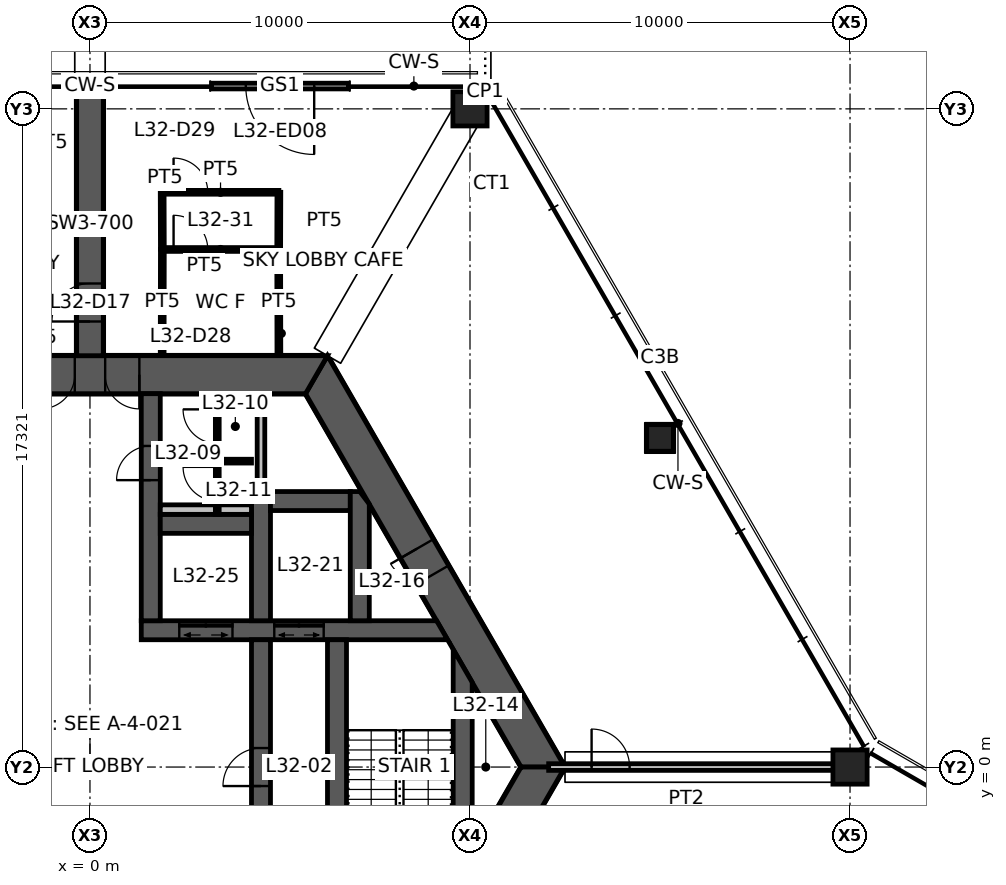
"""IFC4 building model, lengths in metres.
Left out: names, types, materials, properties, quantities, classifications, styles, units other than length and angle.
Written with IfcOpenShell. Run it as: python <this file> out.ifc"""

import sys

from ifc_helpers import new_model, si_unit, direction, frame, frame_2d, origin, origin_2d, place, context, subcontext, project, spatial, polyline, rectangle, hollow_rectangle, outline, extrude, element, fill, save


model = new_model("IFC4")
c1 = context("Model", 3, precision=1e-05, world=origin(), true_north=direction((0.0, 1.0)))
c2 = subcontext(c1, "Body", "Model", "MODEL_VIEW")
j1 = project(units=[si_unit("LENGTHUNIT", "METRE"), si_unit("PLANEANGLEUNIT", "RADIAN")], contexts=[c1])
p1 = place(None, origin())
s1 = spatial("IfcSite", under=j1, at=p1, CompositionType="ELEMENT")
p2 = place(p1, origin())
s2 = spatial("IfcBuilding", under=s1, at=p2, CompositionType="ELEMENT")
p3 = place(p2, frame((0.0, 0.0, 128.6)))
s3 = spatial("IfcBuildingStorey", under=s2, at=p3, CompositionType="ELEMENT", Elevation=128.6)
for number, where, z_axis, x_axis in (
    (1, (20.0, 0.0, 0.0), (0.0, 0.0, 1.0), (1.0, 0.0, 0.0)),
    (2, (10.0, 17.321, 0.0), (0.0, 0.0, 1.0), (1.0, 0.0, 0.0)),
):
    element("IfcColumn", number, at=place(p3, frame(where, z_axis=z_axis, x_axis=x_axis)), inside=s3, PredefinedType="COLUMN", context=c2, shape_type="SweptSolid", body=[
        extrude(hollow_rectangle(XDim=0.9, YDim=0.9, WallThickness=0.07, at=origin_2d()), origin(), (0.0, 0.0, 1.0), 4.5),
    ])
p4 = place(p3, frame((15.0, 8.66, 0.0), z_axis=(0.0, 0.0, 1.0), x_axis=(1.0, 0.0, 0.0)))
e3 = element("IfcColumn", 3, at=p4, inside=s3, PredefinedType="COLUMN", context=c2, shape_type="SweptSolid", body=[
    extrude(hollow_rectangle(XDim=0.7, YDim=0.7, WallThickness=0.036, at=origin_2d()), origin(), (0.0, 0.0, 1.0), 4.5),
])
p5 = place(p3, frame((11.922, 0.0, 0.0), z_axis=(0.0, 0.0, 1.0), x_axis=(-0.500004296715, 0.866022923061, 0.0)))
e4 = element("IfcWall", 4, at=p5, inside=s3, PredefinedType="SHEAR", context=c2, shape_type="SweptSolid", body=[
    extrude(outline(polyline([(-0.289, -0.5), (5.835, -0.5), (6.635, -0.5), (12.211, -0.5), (11.634, 0.5), (6.635, 0.5), (5.835, 0.5), (0.289, 0.5), (-0.289, -0.5)])), origin(), (0.0, 0.0, 1.0), 4.5),
])
p6 = place(p5, frame((5.835, 0.0, 0.0)))
e5 = element("IfcOpeningElement", 5, at=p6, cuts=e4, PredefinedType="OPENING", context=c2, shape_type="SweptSolid", body=[
    extrude(rectangle(XDim=0.8, YDim=2.1, at=frame_2d((0.4, 1.05))), frame((0.0, 0.51, 0.0), z_axis=(0.0, -1.0, 0.0), x_axis=(1.0, 0.0, 0.0)), (0.0, 0.0, 1.0), 1.02),
])
p7 = place(p3, frame((5.961, 10.325, 0.0), z_axis=(0.0, 0.0, 1.0), x_axis=(-1.0, 0.0, 0.0)))
e6 = element("IfcWall", 6, at=p7, inside=s3, PredefinedType="SHEAR", context=c2, shape_type="SweptSolid", body=[
    extrude(outline(polyline([(-0.289, -0.5), (4.661, -0.5), (5.561, -0.5), (6.361, -0.5), (7.261, -0.5), (12.211, -0.5), (11.634, 0.5), (7.261, 0.5), (6.361, 0.5), (5.561, 0.5), (4.661, 0.5), (0.289, 0.5), (-0.289, -0.5)])), origin(), (0.0, 0.0, 1.0), 4.5),
])
p8 = place(p7, frame((6.361, 0.0, 0.0)))
e7 = element("IfcOpeningElement", 7, at=p8, cuts=e6, PredefinedType="OPENING", context=c2, shape_type="SweptSolid", body=[
    extrude(rectangle(XDim=0.9, YDim=2.1, at=frame_2d((0.45, 1.05))), frame((0.0, 0.51, 0.0), z_axis=(0.0, -1.0, 0.0), x_axis=(1.0, 0.0, 0.0)), (0.0, 0.0, 1.0), 1.02),
])
p9 = place(p7, frame((4.661, 0.0, 0.0)))
e8 = element("IfcOpeningElement", 8, at=p9, cuts=e6, PredefinedType="OPENING", context=c2, shape_type="SweptSolid", body=[
    extrude(rectangle(XDim=0.9, YDim=2.1, at=frame_2d((0.45, 1.05))), frame((0.0, 0.51, 0.0), z_axis=(0.0, -1.0, 0.0), x_axis=(1.0, 0.0, 0.0)), (0.0, 0.0, 1.0), 1.02),
])
p10 = place(p3, frame((5.961, -10.325, 0.0), z_axis=(0.0, 0.0, 1.0), x_axis=(0.500004296715, 0.866022923061, 0.0)))
e9 = element("IfcWall", 9, at=p10, inside=s3, PredefinedType="SHEAR", context=c2, shape_type="SweptSolid", body=[
    extrude(outline(polyline([(-0.289, -0.5), (4.594, -0.5), (5.394, -0.5), (12.211, -0.5), (11.634, 0.5), (5.394, 0.5), (4.594, 0.5), (0.289, 0.5), (-0.289, -0.5)])), origin(), (0.0, 0.0, 1.0), 4.5),
])
p11 = place(p10, frame((4.594, 0.0, 0.0)))
e10 = element("IfcOpeningElement", 10, at=p11, cuts=e9, PredefinedType="OPENING", context=c2, shape_type="SweptSolid", body=[
    extrude(rectangle(XDim=0.8, YDim=2.1, at=frame_2d((0.4, 1.05))), frame((0.0, 0.51, 0.0), z_axis=(0.0, -1.0, 0.0), x_axis=(1.0, 0.0, 0.0)), (0.0, 0.0, 1.0), 1.02),
])
p12 = place(p3, frame((0.0, 10.825, 0.0), z_axis=(0.0, 0.0, 1.0), x_axis=(0.0, 1.0, 0.0)))
e11 = element("IfcWall", 11, at=p12, inside=s3, PredefinedType="SHEAR", context=c2, shape_type="SweptSolid", body=[
    extrude(rectangle(XDim=6.946, YDim=0.7, at=frame_2d((3.473, 0.0))), origin(), (0.0, 0.0, 1.0), 4.5),
])
p13 = place(p12, frame((0.9, 0.0, 0.0)))
e12 = element("IfcOpeningElement", 12, at=p13, cuts=e11, PredefinedType="OPENING", context=c2, shape_type="SweptSolid", body=[
    extrude(rectangle(XDim=1.0, YDim=2.1, at=frame_2d((0.5, 1.05))), frame((0.0, 0.36, 0.0), z_axis=(0.0, -1.0, 0.0), x_axis=(1.0, 0.0, 0.0)), (0.0, 0.0, 1.0), 0.72),
])
p14 = place(p3, frame((6.8, 17.92, 0.0), z_axis=(0.0, 0.0, 1.0), x_axis=(-1.0, 0.0, 0.0)))
e13 = element("IfcWall", 13, at=p14, inside=s3, PredefinedType="STANDARD", context=c2, shape_type="SweptSolid", body=[
    extrude(rectangle(XDim=3.6, YDim=0.15, at=frame_2d((1.8, 0.0))), origin(), (0.0, 0.0, 1.0), 4.5),
])
p15 = place(p14, frame((0.9, 0.0, 0.0)))
e14 = element("IfcOpeningElement", 14, at=p15, cuts=e13, PredefinedType="OPENING", context=c2, shape_type="SweptSolid", body=[
    extrude(rectangle(XDim=1.8, YDim=2.1, at=frame_2d((0.9, 1.05))), frame((0.0, 0.085, 0.0), z_axis=(0.0, -1.0, 0.0), x_axis=(1.0, 0.0, 0.0)), (0.0, 0.0, 1.0), 0.17),
])
p16 = place(p3, frame((1.35, 3.6, 0.0), z_axis=(0.0, 0.0, 1.0), x_axis=(1.0, 0.0, 0.0)))
e15 = element("IfcWall", 15, at=p16, inside=s3, PredefinedType="SHEAR", context=c2, shape_type="SweptSolid", body=[
    extrude(outline(polyline([(0.0, -0.25), (1.0, -0.25), (2.4, -0.25), (3.5, -0.25), (4.8, -0.25), (8.061, -0.25), (7.772, 0.25), (4.8, 0.25), (3.5, 0.25), (2.4, 0.25), (1.0, 0.25), (0.0, 0.25), (0.0, -0.25)])), origin(), (0.0, 0.0, 1.0), 4.5),
])
p17 = place(p16, frame((1.0, 0.0, 0.0)))
e16 = element("IfcOpeningElement", 16, at=p17, cuts=e15, PredefinedType="OPENING", context=c2, shape_type="SweptSolid", body=[
    extrude(rectangle(XDim=1.4, YDim=2.1, at=frame_2d((0.7, 1.05))), frame((0.0, 0.26, 0.0), z_axis=(0.0, -1.0, 0.0), x_axis=(1.0, 0.0, 0.0)), (0.0, 0.0, 1.0), 0.52),
])
p18 = place(p16, frame((3.5, 0.0, 0.0)))
e17 = element("IfcOpeningElement", 17, at=p18, cuts=e15, PredefinedType="OPENING", context=c2, shape_type="SweptSolid", body=[
    extrude(rectangle(XDim=1.3, YDim=2.1, at=frame_2d((0.65, 1.05))), frame((0.0, 0.26, 0.0), z_axis=(0.0, -1.0, 0.0), x_axis=(1.0, 0.0, 0.0)), (0.0, 0.0, 1.0), 0.52),
])
p19 = place(p3, frame((1.6, 3.85, 0.0), z_axis=(0.0, 0.0, 1.0), x_axis=(0.0, 1.0, 0.0)))
e18 = element("IfcWall", 18, at=p19, inside=s3, PredefinedType="SHEAR", context=c2, shape_type="SweptSolid", body=[
    extrude(rectangle(XDim=5.975, YDim=0.5, at=frame_2d((2.987, 0.0))), origin(), (0.0, 0.0, 1.0), 4.5),
])
p20 = place(p19, frame((3.7, 0.0, 0.0)))
e19 = element("IfcOpeningElement", 19, at=p20, cuts=e18, PredefinedType="OPENING", context=c2, shape_type="SweptSolid", body=[
    extrude(rectangle(XDim=0.9, YDim=2.1, at=frame_2d((0.45, 1.05))), frame((0.0, 0.26, 0.0), z_axis=(0.0, -1.0, 0.0), x_axis=(1.0, 0.0, 0.0)), (0.0, 0.0, 1.0), 0.52),
])
p21 = place(p3, frame((4.5, -3.35, 0.0), z_axis=(0.0, 0.0, 1.0), x_axis=(0.0, 1.0, 0.0)))
e20 = element("IfcWall", 20, at=p21, inside=s3, PredefinedType="SHEAR", context=c2, shape_type="SweptSolid", body=[
    extrude(rectangle(XDim=6.7, YDim=0.5, at=frame_2d((3.35, 0.0))), origin(), (0.0, 0.0, 1.0), 4.5),
])
p22 = place(p21, frame((2.85, 0.0, 0.0)))
e21 = element("IfcOpeningElement", 21, at=p22, cuts=e20, PredefinedType="OPENING", context=c2, shape_type="SweptSolid", body=[
    extrude(rectangle(XDim=1.0, YDim=2.1, at=frame_2d((0.5, 1.05))), frame((0.0, 0.26, 0.0), z_axis=(0.0, -1.0, 0.0), x_axis=(1.0, 0.0, 0.0)), (0.0, 0.0, 1.0), 0.52),
])
p23 = place(p3, frame((6.5, -3.35, 0.0), z_axis=(0.0, 0.0, 1.0), x_axis=(0.0, 1.0, 0.0)))
e22 = element("IfcWall", 22, at=p23, inside=s3, PredefinedType="SHEAR", context=c2, shape_type="SweptSolid", body=[
    extrude(rectangle(XDim=6.7, YDim=0.5, at=frame_2d((3.35, 0.0))), origin(), (0.0, 0.0, 1.0), 4.5),
])
p24 = place(p23, frame((0.1, 0.0, 0.0)))
e23 = element("IfcOpeningElement", 23, at=p24, cuts=e22, PredefinedType="OPENING", context=c2, shape_type="SweptSolid", body=[
    extrude(rectangle(XDim=1.0, YDim=2.1, at=frame_2d((0.5, 1.05))), frame((0.0, 0.26, 0.0), z_axis=(0.0, -1.0, 0.0), x_axis=(1.0, 0.0, 0.0)), (0.0, 0.0, 1.0), 0.52),
])
p25 = place(p3, frame((4.5, 3.85, 0.0), z_axis=(0.0, 0.0, 1.0), x_axis=(0.0, 1.0, 0.0)))
e24 = element("IfcWall", 24, at=p25, inside=s3, PredefinedType="SHEAR", context=c2, shape_type="SweptSolid", body=[
    extrude(rectangle(XDim=3.4, YDim=0.5, at=frame_2d((1.7, 0.0))), origin(), (0.0, 0.0, 1.0), 4.5),
])
p26 = place(p3, frame((1.85, 6.4, 0.0), z_axis=(0.0, 0.0, 1.0), x_axis=(1.0, 0.0, 0.0)))
e25 = element("IfcWall", 25, at=p26, inside=s3, PredefinedType="SHEAR", context=c2, shape_type="SweptSolid", body=[
    extrude(rectangle(XDim=2.4, YDim=0.5, at=frame_2d((1.2, 0.0))), origin(), (0.0, 0.0, 1.0), 4.5),
])
p27 = place(p3, frame((4.75, 7.0, 0.0), z_axis=(0.0, 0.0, 1.0), x_axis=(1.0, 0.0, 0.0)))
e26 = element("IfcWall", 26, at=p27, inside=s3, PredefinedType="SHEAR", context=c2, shape_type="SweptSolid", body=[
    extrude(rectangle(XDim=2.1, YDim=0.5, at=frame_2d((1.05, 0.0))), origin(), (0.0, 0.0, 1.0), 4.5),
])
p28 = place(p3, frame((7.1, 3.85, 0.0), z_axis=(0.0, 0.0, 1.0), x_axis=(0.0, 1.0, 0.0)))
e27 = element("IfcWall", 27, at=p28, inside=s3, PredefinedType="SHEAR", context=c2, shape_type="SweptSolid", body=[
    extrude(outline(polyline([(0.0, -0.25), (3.069, -0.25), (3.4, 0.0), (3.4, 0.25), (0.0, 0.25), (0.0, -0.25)])), origin(), (0.0, 0.0, 1.0), 4.5),
])
p29 = place(p3, frame((9.808, -2.662, 0.0), z_axis=(0.0, 0.0, 1.0), x_axis=(0.0, 1.0, 0.0)))
e28 = element("IfcWall", 28, at=p29, inside=s3, PredefinedType="SHEAR", context=c2, shape_type="SweptSolid", body=[
    extrude(outline(polyline([(0.433, -0.25), (4.892, -0.25), (5.758, 0.25), (-0.433, 0.25), (0.433, -0.25)])), origin(), (0.0, 0.0, 1.0), 4.5),
])
p30 = place(p3, frame((4.5, 7.25, 0.0), z_axis=(0.0, 0.0, 1.0), x_axis=(0.0, 1.0, 0.0)))
e29 = element("IfcWall", 29, at=p30, inside=s3, PredefinedType="STANDARD", context=c2, shape_type="SweptSolid", body=[
    extrude(rectangle(XDim=2.575, YDim=0.2, at=frame_2d((1.288, 0.0))), origin(), (0.0, 0.0, 1.0), 4.5),
])
p31 = place(p3, frame((1.85, 6.775, 0.0), z_axis=(0.0, 0.0, 1.0), x_axis=(1.0, 0.0, 0.0)))
e30 = element("IfcWall", 30, at=p31, inside=s3, PredefinedType="PLUMBINGWALL", context=c2, shape_type="SweptSolid", body=[
    extrude(rectangle(XDim=2.4, YDim=0.25, at=frame_2d((1.2, 0.0))), origin(), (0.0, 0.0, 1.0), 4.5),
])
p32 = place(p3, frame((3.35, 6.65, 0.0), z_axis=(0.0, 0.0, 1.0), x_axis=(0.0, 1.0, 0.0)))
e31 = element("IfcWall", 31, at=p32, inside=s3, PredefinedType="PARTITIONING", context=c2, shape_type="SweptSolid", body=[
    extrude(rectangle(XDim=3.175, YDim=0.1, at=frame_2d((1.587, 0.0))), origin(), (0.0, 0.0, 1.0), 3.55),
])
p33 = place(p32, frame((1.863, 0.0, 0.0)))
e32 = element("IfcOpeningElement", 32, at=p33, cuts=e31, PredefinedType="OPENING", context=c2, shape_type="SweptSolid", body=[
    extrude(rectangle(XDim=0.9, YDim=2.1, at=frame_2d((0.45, 1.05))), frame((0.0, 0.06, 0.0), z_axis=(0.0, -1.0, 0.0), x_axis=(1.0, 0.0, 0.0)), (0.0, 0.0, 1.0), 0.12),
])
p34 = place(p32, frame((0.35, 0.0, 0.0)))
e33 = element("IfcOpeningElement", 33, at=p34, cuts=e31, PredefinedType="OPENING", context=c2, shape_type="SweptSolid", body=[
    extrude(rectangle(XDim=0.9, YDim=2.1, at=frame_2d((0.45, 1.05))), frame((0.0, 0.06, 0.0), z_axis=(0.0, -1.0, 0.0), x_axis=(1.0, 0.0, 0.0)), (0.0, 0.0, 1.0), 0.12),
])
p35 = place(p3, frame((3.4, 8.05, 0.0), z_axis=(0.0, 0.0, 1.0), x_axis=(1.0, 0.0, 0.0)))
e34 = element("IfcWall", 34, at=p35, inside=s3, PredefinedType="PARTITIONING", context=c2, shape_type="SweptSolid", body=[
    extrude(rectangle(XDim=0.85, YDim=0.1, at=frame_2d((0.425, 0.0))), origin(), (0.0, 0.0, 1.0), 3.55),
])
p36 = place(p3, frame((12.07, 0.0, 0.0), z_axis=(0.0, 0.0, 1.0), x_axis=(1.0, 0.0, 0.0)))
e35 = element("IfcWall", 35, at=p36, inside=s3, PredefinedType="PARTITIONING", context=c2, shape_type="SweptSolid", body=[
    extrude(rectangle(XDim=7.93, YDim=0.175, at=frame_2d((3.965, 0.0))), origin(), (0.0, 0.0, 1.0), 3.65),
])
p37 = place(p36, frame((1.13, 0.0, 0.0)))
e36 = element("IfcOpeningElement", 36, at=p37, cuts=e35, PredefinedType="OPENING", context=c2, shape_type="SweptSolid", body=[
    extrude(rectangle(XDim=1.0, YDim=2.1, at=frame_2d((0.5, 1.05))), frame((0.0, 0.098, 0.0), z_axis=(0.0, -1.0, 0.0), x_axis=(1.0, 0.0, 0.0)), (0.0, 0.0, 1.0), 0.195),
])
p38 = place(p3, frame((1.9, 13.62, 0.0), z_axis=(0.0, 0.0, 1.0), x_axis=(1.0, 0.0, 0.0)))
e37 = element("IfcWall", 37, at=p38, inside=s3, PredefinedType="PARTITIONING", context=c2, shape_type="SweptSolid", body=[
    extrude(rectangle(XDim=3.071, YDim=0.1, at=frame_2d((1.536, 0.0))), origin(), (0.0, 0.0, 1.0), 3.55),
])
p39 = place(p38, frame((0.3, 0.0, 0.0)))
e38 = element("IfcOpeningElement", 38, at=p39, cuts=e37, PredefinedType="OPENING", context=c2, shape_type="SweptSolid", body=[
    extrude(rectangle(XDim=0.9, YDim=2.1, at=frame_2d((0.45, 1.05))), frame((0.0, 0.06, 0.0), z_axis=(0.0, -1.0, 0.0), x_axis=(1.0, 0.0, 0.0)), (0.0, 0.0, 1.0), 0.12),
])
for number, where, z_axis, x_axis in (
    (39, (1.9, 10.845, 0.0), (0.0, 0.0, 1.0), (0.002, 1.0, 0.0)),
    (40, (4.966, 13.625, 0.0), (0.0, 0.0, 1.0), (0.002, -1.0, 0.0)),
):
    element("IfcWall", number, at=place(p3, frame(where, z_axis=z_axis, x_axis=x_axis)), inside=s3, PredefinedType="PARTITIONING", context=c2, shape_type="SweptSolid", body=[
        extrude(rectangle(XDim=2.78, YDim=0.1, at=frame_2d((1.39, 0.0))), origin(), (0.0, 0.0, 1.0), 3.55),
    ])
p40 = place(p3, frame((1.9, 15.125, 0.0), z_axis=(0.0, 0.0, 1.0), x_axis=(1.0, 0.0, 0.0)))
e41 = element("IfcWall", 41, at=p40, inside=s3, PredefinedType="PARTITIONING", context=c2, shape_type="SweptSolid", body=[
    extrude(rectangle(XDim=3.071, YDim=0.1, at=frame_2d((1.536, 0.0))), origin(), (0.0, 0.0, 1.0), 3.55),
])
p41 = place(p40, frame((0.3, 0.0, 0.0)))
e42 = element("IfcOpeningElement", 42, at=p41, cuts=e41, PredefinedType="OPENING", context=c2, shape_type="SweptSolid", body=[
    extrude(rectangle(XDim=0.9, YDim=2.1, at=frame_2d((0.45, 1.05))), frame((0.0, 0.06, 0.0), z_axis=(0.0, -1.0, 0.0), x_axis=(1.0, 0.0, 0.0)), (0.0, 0.0, 1.0), 0.12),
])
for number, where, z_axis, x_axis in (
    (43, (1.905, 13.625, 0.0), (0.0, 0.0, 1.0), (-0.003, 1.0, 0.0)),
    (44, (4.971, 15.125, 0.0), (0.0, 0.0, 1.0), (-0.003, -1.0, 0.0)),
):
    element("IfcWall", number, at=place(p3, frame(where, z_axis=z_axis, x_axis=x_axis)), inside=s3, PredefinedType="PARTITIONING", context=c2, shape_type="SweptSolid", body=[
        extrude(rectangle(XDim=1.5, YDim=0.1, at=frame_2d((0.75, 0.0))), origin(), (0.0, 0.0, 1.0), 3.55),
    ])
p42 = place(p3, frame((0.0, 17.771, 0.0), z_axis=(0.0, 0.0, 1.0), x_axis=(0.0, 1.0, 0.0)))
e45 = element("IfcWall", 45, at=p42, inside=s3, PredefinedType="PARTITIONING", context=c2, shape_type="SweptSolid", body=[
    extrude(rectangle(XDim=0.045, YDim=0.175, at=frame_2d((0.022, 0.0))), origin(), (0.0, 0.0, 1.0), 4.5),
])
p43 = place(p15, origin())
e46 = element("IfcDoor", 46, at=p43, inside=s3, OperationType="DOUBLE_DOOR_SINGLE_SWING", PredefinedType="DOOR", context=c2, shape_type="SweptSolid", body=[
    extrude(rectangle(XDim=1.8, YDim=2.1, at=frame_2d((0.9, 1.05))), frame((0.0, 0.025, 0.0), z_axis=(0.0, -1.0, 0.0), x_axis=(1.0, 0.0, 0.0)), (0.0, 0.0, 1.0), 0.05),
])
fill(e14, e46)
p44 = place(p8, origin())
e47 = element("IfcDoor", 47, at=p44, inside=s3, OperationType="SINGLE_SWING_RIGHT", PredefinedType="DOOR", context=c2, shape_type="SweptSolid", body=[
    extrude(rectangle(XDim=0.9, YDim=2.1, at=frame_2d((0.45, 1.05))), frame((0.0, 0.025, 0.0), z_axis=(0.0, -1.0, 0.0), x_axis=(1.0, 0.0, 0.0)), (0.0, 0.0, 1.0), 0.05),
])
fill(e7, e47)
p45 = place(p9, origin())
e48 = element("IfcDoor", 48, at=p45, inside=s3, OperationType="SINGLE_SWING_LEFT", PredefinedType="DOOR", context=c2, shape_type="SweptSolid", body=[
    extrude(rectangle(XDim=0.9, YDim=2.1, at=frame_2d((0.45, 1.05))), frame((0.0, 0.025, 0.0), z_axis=(0.0, -1.0, 0.0), x_axis=(1.0, 0.0, 0.0)), (0.0, 0.0, 1.0), 0.05),
])
fill(e8, e48)
p46 = place(p6, origin())
e49 = element("IfcDoor", 49, at=p46, inside=s3, OperationType="SINGLE_SWING_RIGHT", PredefinedType="DOOR", context=c2, shape_type="SweptSolid", body=[
    extrude(rectangle(XDim=0.8, YDim=2.1, at=frame_2d((0.4, 1.05))), frame((0.0, 0.025, 0.0), z_axis=(0.0, -1.0, 0.0), x_axis=(1.0, 0.0, 0.0)), (0.0, 0.0, 1.0), 0.05),
])
fill(e5, e49)
p47 = place(p22, origin())
e50 = element("IfcDoor", 50, at=p47, inside=s3, OperationType="SINGLE_SWING_LEFT", PredefinedType="DOOR", context=c2, shape_type="SweptSolid", body=[
    extrude(rectangle(XDim=1.0, YDim=2.1, at=frame_2d((0.5, 1.05))), frame((0.0, 0.025, 0.0), z_axis=(0.0, -1.0, 0.0), x_axis=(1.0, 0.0, 0.0)), (0.0, 0.0, 1.0), 0.05),
])
fill(e21, e50)
p48 = place(p20, origin())
e51 = element("IfcDoor", 51, at=p48, inside=s3, OperationType="SINGLE_SWING_LEFT", PredefinedType="DOOR", context=c2, shape_type="SweptSolid", body=[
    extrude(rectangle(XDim=0.9, YDim=2.1, at=frame_2d((0.45, 1.05))), frame((0.0, 0.025, 0.0), z_axis=(0.0, -1.0, 0.0), x_axis=(1.0, 0.0, 0.0)), (0.0, 0.0, 1.0), 0.05),
])
fill(e19, e51)
p49 = place(p13, origin())
e52 = element("IfcDoor", 52, at=p49, inside=s3, OperationType="SINGLE_SWING_LEFT", PredefinedType="DOOR", context=c2, shape_type="SweptSolid", body=[
    extrude(rectangle(XDim=1.0, YDim=2.1, at=frame_2d((0.5, 1.05))), frame((0.0, 0.025, 0.0), z_axis=(0.0, -1.0, 0.0), x_axis=(1.0, 0.0, 0.0)), (0.0, 0.0, 1.0), 0.05),
])
fill(e12, e52)
p50 = place(p33, origin())
e53 = element("IfcDoor", 53, at=p50, inside=s3, OperationType="SINGLE_SWING_RIGHT", PredefinedType="DOOR", context=c2, shape_type="SweptSolid", body=[
    extrude(rectangle(XDim=0.9, YDim=2.1, at=frame_2d((0.45, 1.05))), frame((0.0, 0.025, 0.0), z_axis=(0.0, -1.0, 0.0), x_axis=(1.0, 0.0, 0.0)), (0.0, 0.0, 1.0), 0.05),
])
fill(e32, e53)
p51 = place(p34, origin())
e54 = element("IfcDoor", 54, at=p51, inside=s3, OperationType="SINGLE_SWING_RIGHT", PredefinedType="DOOR", context=c2, shape_type="SweptSolid", body=[
    extrude(rectangle(XDim=0.9, YDim=2.1, at=frame_2d((0.45, 1.05))), frame((0.0, 0.025, 0.0), z_axis=(0.0, -1.0, 0.0), x_axis=(1.0, 0.0, 0.0)), (0.0, 0.0, 1.0), 0.05),
])
fill(e33, e54)
p52 = place(p37, origin())
e55 = element("IfcDoor", 55, at=p52, inside=s3, OperationType="SINGLE_SWING_LEFT", PredefinedType="DOOR", context=c2, shape_type="SweptSolid", body=[
    extrude(rectangle(XDim=1.0, YDim=2.1, at=frame_2d((0.5, 1.05))), frame((0.0, 0.025, 0.0), z_axis=(0.0, -1.0, 0.0), x_axis=(1.0, 0.0, 0.0)), (0.0, 0.0, 1.0), 0.05),
])
fill(e36, e55)
p53 = place(p39, origin())
e56 = element("IfcDoor", 56, at=p53, inside=s3, OperationType="SINGLE_SWING_LEFT", PredefinedType="DOOR", context=c2, shape_type="SweptSolid", body=[
    extrude(rectangle(XDim=0.9, YDim=2.1, at=frame_2d((0.45, 1.05))), frame((0.0, 0.025, 0.0), z_axis=(0.0, -1.0, 0.0), x_axis=(1.0, 0.0, 0.0)), (0.0, 0.0, 1.0), 0.05),
])
fill(e38, e56)
p54 = place(p41, origin())
e57 = element("IfcDoor", 57, at=p54, inside=s3, OperationType="SINGLE_SWING_LEFT", PredefinedType="DOOR", context=c2, shape_type="SweptSolid", body=[
    extrude(rectangle(XDim=0.9, YDim=2.1, at=frame_2d((0.45, 1.05))), frame((0.0, 0.025, 0.0), z_axis=(0.0, -1.0, 0.0), x_axis=(1.0, 0.0, 0.0)), (0.0, 0.0, 1.0), 0.05),
])
fill(e42, e57)
p55 = place(p17, origin())
e58 = element("IfcDoor", 58, at=p55, inside=s3, OperationType="DOUBLE_DOOR_SLIDING", PredefinedType="DOOR", context=c2, shape_type="SweptSolid", body=[
    extrude(rectangle(XDim=1.4, YDim=2.1, at=frame_2d((0.7, 1.05))), frame((0.0, 0.025, 0.0), z_axis=(0.0, -1.0, 0.0), x_axis=(1.0, 0.0, 0.0)), (0.0, 0.0, 1.0), 0.05),
])
fill(e16, e58)
p56 = place(p18, origin())
e59 = element("IfcDoor", 59, at=p56, inside=s3, OperationType="DOUBLE_DOOR_SLIDING", PredefinedType="DOOR", context=c2, shape_type="SweptSolid", body=[
    extrude(rectangle(XDim=1.3, YDim=2.1, at=frame_2d((0.65, 1.05))), frame((0.0, 0.025, 0.0), z_axis=(0.0, -1.0, 0.0), x_axis=(1.0, 0.0, 0.0)), (0.0, 0.0, 1.0), 0.05),
])
fill(e17, e59)
save(model, sys.argv[1])
